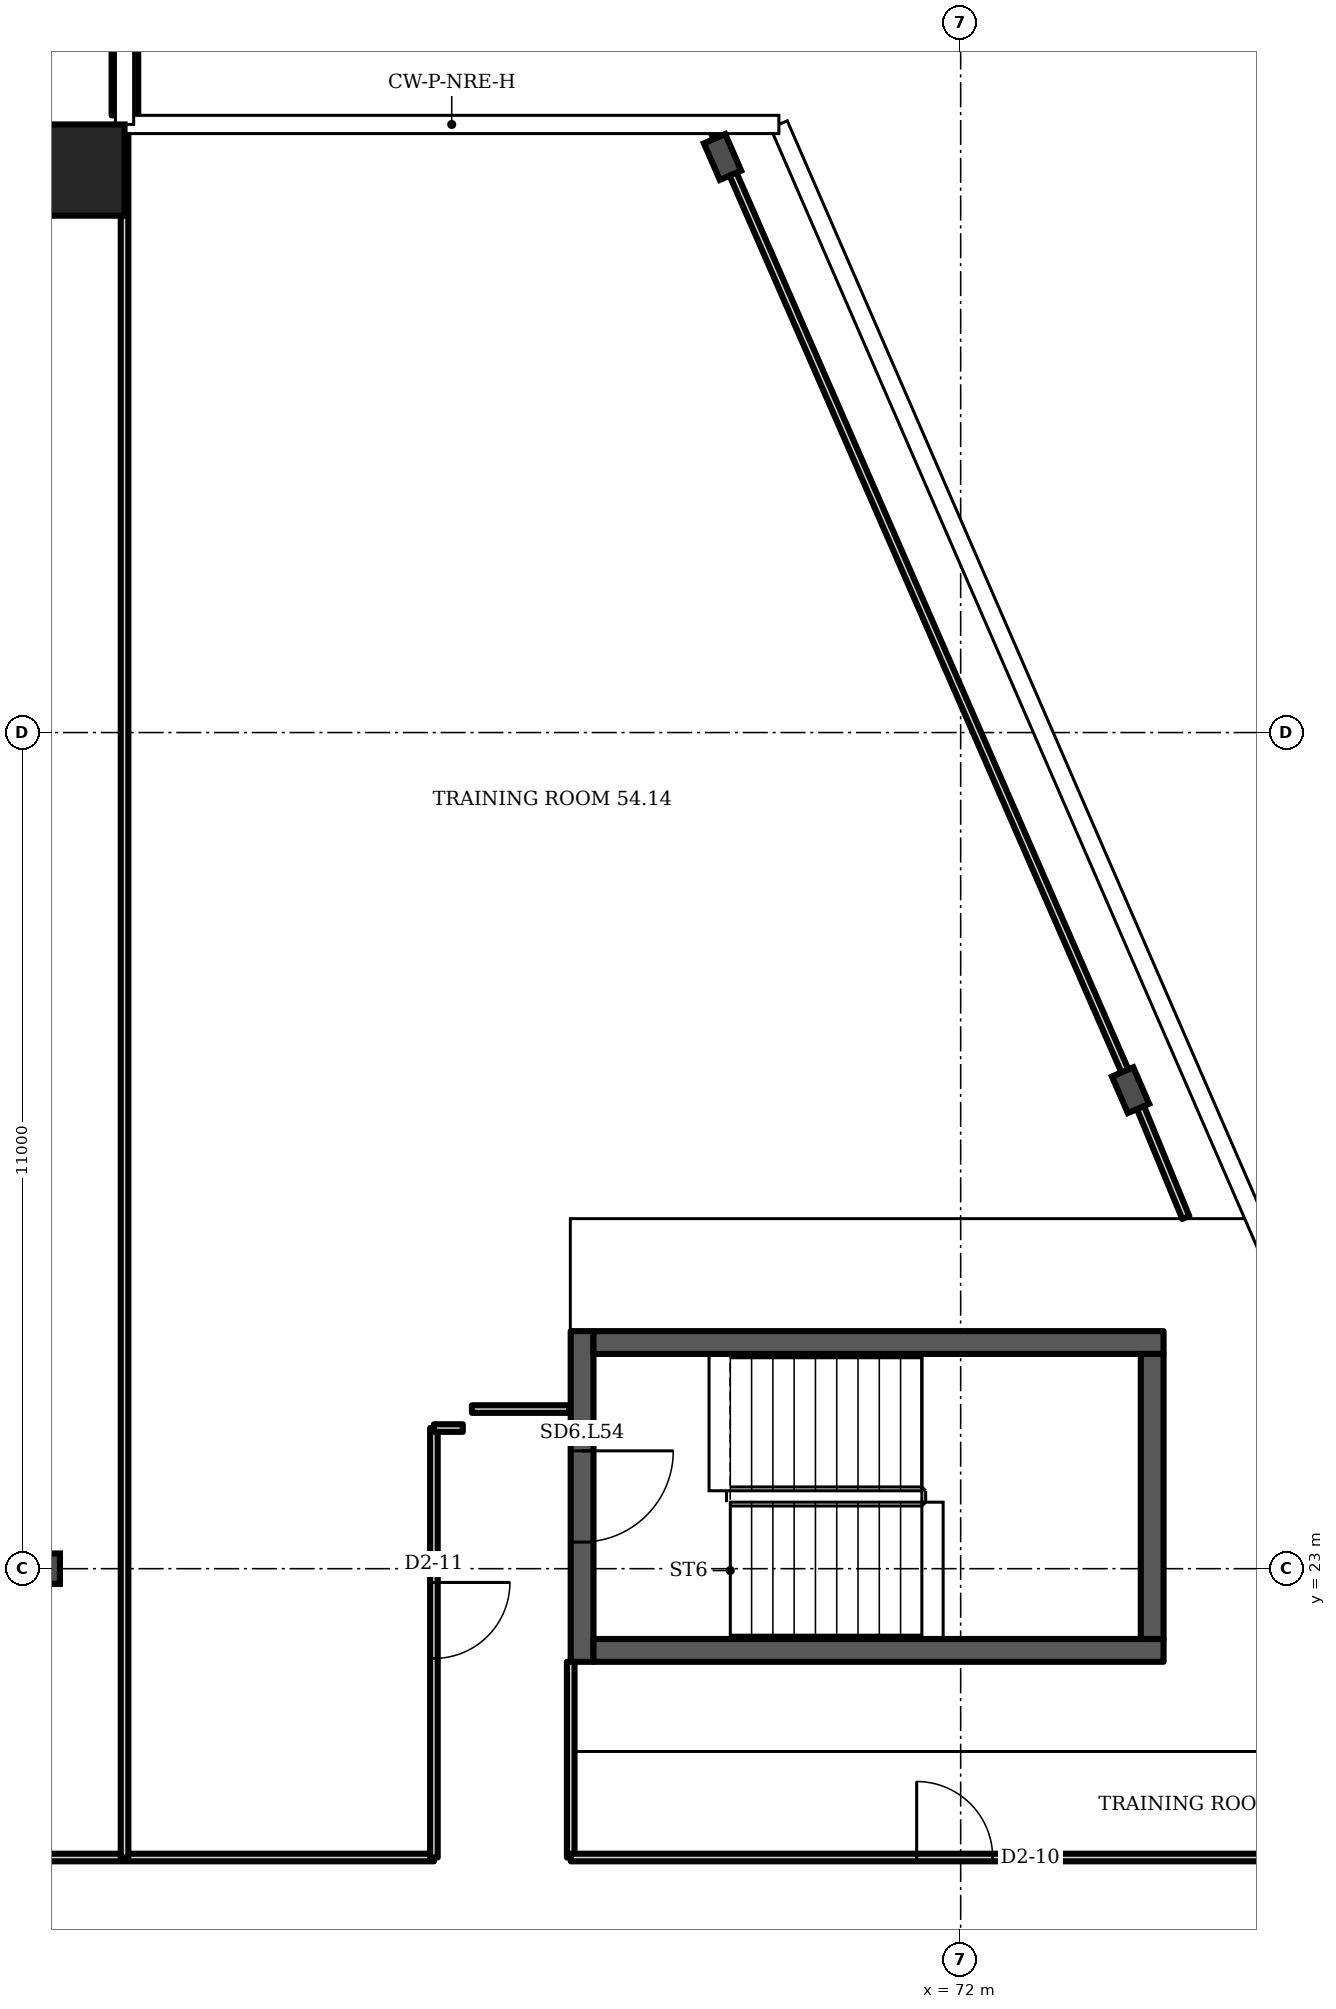
"""IFC4 building model, lengths in metres.
Left out: names, types, materials, properties, quantities, classifications, styles, units other than length and angle.
Written with IfcOpenShell. Run it as: python <this file> out.ifc"""

import sys

from ifc_helpers import new_model, si_unit, direction, frame, frame_2d, origin, origin_2d, place, context, subcontext, project, spatial, rectangle, i_section, extrude, element, fill, save


model = new_model("IFC4")
c1 = context("Model", 3, precision=1e-05, world=origin(), true_north=direction((0.0, 1.0)))
c2 = subcontext(c1, "Body", "Model", "MODEL_VIEW")
j1 = project(units=[si_unit("LENGTHUNIT", "METRE"), si_unit("PLANEANGLEUNIT", "RADIAN")], contexts=[c1])
p1 = place(None, origin())
s1 = spatial("IfcSite", under=j1, at=p1, CompositionType="ELEMENT")
p2 = place(p1, origin())
s2 = spatial("IfcBuilding", under=s1, at=p2, CompositionType="ELEMENT")
p3 = place(p2, frame((0.0, 0.0, 217.9)))
s3 = spatial("IfcBuildingStorey", under=s2, at=p3, CompositionType="ELEMENT", Elevation=217.9)
p4 = place(p3, frame((60.4, 41.4, 0.0), z_axis=(0.0, 0.0, 1.0), x_axis=(1.0, 0.0, 0.0)))
e1 = element("IfcColumn", 1, at=p4, inside=s3, PredefinedType="COLUMN", context=c2, shape_type="SweptSolid", body=[
    extrude(rectangle(XDim=1.2, YDim=1.2, at=origin_2d()), origin(), (0.0, 0.0, 1.0), 3.6),
])
for number, where, z_axis, x_axis in (
    (2, (74.235, 29.295, 0.0), (0.0, 0.0, 1.0), (0.917, 0.399, 0.0)),
    (3, (68.867, 41.572, 0.0), (0.0, 0.0, 1.0), (0.917, 0.399, 0.0)),
):
    element("IfcColumn", number, at=place(p3, frame(where, z_axis=z_axis, x_axis=x_axis)), inside=s3, PredefinedType="COLUMN", context=c2, shape_type="SweptSolid", body=[
        extrude(i_section(OverallWidth=0.306, OverallDepth=0.524, WebThickness=0.021, FlangeThickness=0.04, FilletRadius=0.027, at=origin_2d()), origin(), (0.0, 0.0, 1.0), 3.6),
    ])
p5 = place(p3, frame((60.0, 23.0, 0.0), z_axis=(0.0, 0.0, 1.0), x_axis=(1.0, 0.0, 0.0)))
e4 = element("IfcColumn", 4, at=p5, inside=s3, PredefinedType="COLUMN", context=c2, shape_type="SweptSolid", body=[
    extrude(i_section(OverallWidth=0.3, OverallDepth=0.4, WebThickness=0.013, FlangeThickness=0.024, FilletRadius=0.027, at=origin_2d()), origin(), (0.0, 0.0, 1.0), 3.6),
])
p6 = place(p3, frame((61.005, 42.12, 0.0), z_axis=(0.0, 0.0, 1.0), x_axis=(0.0, 1.0, 0.0)))
e5 = element("IfcWall", 5, at=p6, inside=s3, PredefinedType="SOLIDWALL", context=c2, shape_type="SweptSolid", body=[
    extrude(rectangle(XDim=6.006, YDim=0.35, at=frame_2d((3.003, 0.0))), origin(), (0.0, 0.0, 1.0), 1.0),
])
p7 = place(p3, frame((67.02, 21.775, 0.0), z_axis=(0.0, 0.0, 1.0), x_axis=(0.0, 1.0, 0.0)))
e6 = element("IfcWall", 6, at=p7, inside=s3, PredefinedType="SHEAR", context=c2, shape_type="SweptSolid", body=[
    extrude(rectangle(XDim=4.35, YDim=0.3, at=frame_2d((2.175, 0.0))), origin(), (0.0, 0.0, 1.0), 3.2),
])
p8 = place(p7, frame((1.575, 0.0, 0.0)))
e7 = element("IfcOpeningElement", 7, at=p8, cuts=e6, PredefinedType="OPENING", context=c2, shape_type="SweptSolid", body=[
    extrude(rectangle(XDim=1.2, YDim=2.1, at=frame_2d((0.6, 1.05))), frame((0.0, 0.16, 0.0), z_axis=(0.0, -1.0, 0.0), x_axis=(1.0, 0.0, 0.0)), (0.0, 0.0, 1.0), 0.32),
])
p9 = place(p3, frame((47.36, 19.2, 0.0), z_axis=(0.0, 0.0, 1.0), x_axis=(1.0, 0.0, 0.0)))
e8 = element("IfcWall", 8, at=p9, inside=s3, PredefinedType="PARTITIONING", context=c2, shape_type="SweptSolid", body=[
    extrude(rectangle(XDim=17.71, YDim=0.1, at=frame_2d((8.855, 0.0))), origin(), (0.0, 0.0, 1.0), 3.2),
])
p10 = place(p3, frame((61.0, 19.2, 0.0), z_axis=(0.0, 0.0, 1.0), x_axis=(0.0, 1.0, 0.0)))
e9 = element("IfcWall", 9, at=p10, inside=s3, PredefinedType="PARTITIONING", context=c2, shape_type="SweptSolid", body=[
    extrude(rectangle(XDim=22.78, YDim=0.1, at=frame_2d((11.39, 0.0))), origin(), (0.0, 0.0, 1.0), 3.2),
])
p11 = place(p3, frame((65.07, 19.2, 0.0), z_axis=(0.0, 0.0, 1.0), x_axis=(0.0, 1.0, 0.0)))
e10 = element("IfcWall", 10, at=p11, inside=s3, PredefinedType="PARTITIONING", context=c2, shape_type="SweptSolid", body=[
    extrude(rectangle(XDim=5.65, YDim=0.1, at=frame_2d((2.825, 0.0))), origin(), (0.0, 0.0, 1.0), 3.2),
])
p12 = place(p11, frame((2.619, 0.0, 0.0)))
e11 = element("IfcOpeningElement", 11, at=p12, cuts=e10, PredefinedType="OPENING", context=c2, shape_type="SweptSolid", body=[
    extrude(rectangle(XDim=1.0, YDim=2.1, at=frame_2d((0.5, 1.05))), frame((0.0, 0.06, 0.0), z_axis=(0.0, -1.0, 0.0), x_axis=(1.0, 0.0, 0.0)), (0.0, 0.0, 1.0), 0.12),
])
p13 = place(p3, frame((65.07, 24.85, 0.0), z_axis=(0.0, 0.0, 1.0), x_axis=(1.0, 0.0, 0.0)))
e12 = element("IfcWall", 12, at=p13, inside=s3, PredefinedType="PARTITIONING", context=c2, shape_type="SweptSolid", body=[
    extrude(rectangle(XDim=0.38, YDim=0.1, at=frame_2d((0.19, 0.0))), origin(), (0.0, 0.0, 1.0), 3.2),
])
p14 = place(p3, frame((65.57, 25.1, 0.0), z_axis=(0.0, 0.0, 1.0), x_axis=(1.0, 0.0, 0.0)))
e13 = element("IfcWall", 13, at=p14, inside=s3, PredefinedType="PARTITIONING", context=c2, shape_type="SweptSolid", body=[
    extrude(rectangle(XDim=1.28, YDim=0.1, at=frame_2d((0.64, 0.0))), origin(), (0.0, 0.0, 1.0), 3.2),
])
p15 = place(p3, frame((66.87, 19.2, 0.0), z_axis=(0.0, 0.0, 1.0), x_axis=(0.0, 1.0, 0.0)))
e14 = element("IfcWall", 14, at=p15, inside=s3, PredefinedType="PARTITIONING", context=c2, shape_type="SweptSolid", body=[
    extrude(rectangle(XDim=2.575, YDim=0.1, at=frame_2d((1.288, 0.0))), origin(), (0.0, 0.0, 1.0), 3.2),
])
p16 = place(p3, frame((66.87, 19.2, 0.0), z_axis=(0.0, 0.0, 1.0), x_axis=(1.0, 0.0, 0.0)))
e15 = element("IfcWall", 15, at=p16, inside=s3, PredefinedType="PARTITIONING", context=c2, shape_type="SweptSolid", body=[
    extrude(rectangle(XDim=11.57, YDim=0.1, at=frame_2d((5.785, 0.0))), origin(), (0.0, 0.0, 1.0), 3.2),
])
p17 = place(p16, frame((4.551, 0.0, 0.0)))
e16 = element("IfcOpeningElement", 16, at=p17, cuts=e15, PredefinedType="OPENING", context=c2, shape_type="SweptSolid", body=[
    extrude(rectangle(XDim=1.0, YDim=2.1, at=frame_2d((0.5, 1.05))), frame((0.0, 0.06, 0.0), z_axis=(0.0, -1.0, 0.0), x_axis=(1.0, 0.0, 0.0)), (0.0, 0.0, 1.0), 0.12),
])
p18 = place(p3, frame((74.265, 29.31, 0.0), z_axis=(0.0, 0.0, 1.0), x_axis=(-0.400401, 0.916335, 0.0)))
e17 = element("IfcWall", 17, at=p18, inside=s3, PredefinedType="PARTITIONING", context=c2, shape_type="SweptSolid", body=[
    extrude(rectangle(XDim=13.795, YDim=0.1, at=frame_2d((6.897, 0.0))), origin(), (0.0, 0.0, 1.0), 2.58),
])
p19 = place(p3, frame((74.962, 27.62, 0.0), z_axis=(0.0, 0.0, 1.0), x_axis=(-0.381293, 0.924452, 0.0)))
e18 = element("IfcWall", 18, at=p19, inside=s3, PredefinedType="PARTITIONING", context=c2, shape_type="SweptSolid", body=[
    extrude(rectangle(XDim=1.828, YDim=0.1, at=frame_2d((0.914, 0.0))), origin(), (0.0, 0.0, 1.0), 2.58),
])
for number, where, z_axis, x_axis in (
    (19, (67.17, 21.925, 0.0), (0.0, 0.0, 1.0), (1.0, 0.0, 0.0)),
    (20, (67.17, 25.975, 0.0), (0.0, 0.0, 1.0), (1.0, 0.0, 0.0)),
):
    element("IfcWall", number, at=place(p3, frame(where, z_axis=z_axis, x_axis=x_axis)), inside=s3, PredefinedType="SHEAR", context=c2, shape_type="SweptSolid", body=[
        extrude(rectangle(XDim=7.5, YDim=0.3, at=frame_2d((3.75, 0.0))), origin(), (0.0, 0.0, 1.0), 3.2),
    ])
p20 = place(p3, frame((74.52, 22.075, 0.0), z_axis=(0.0, 0.0, 1.0), x_axis=(0.0, 1.0, 0.0)))
e21 = element("IfcWall", 21, at=p20, inside=s3, PredefinedType="SHEAR", context=c2, shape_type="SweptSolid", body=[
    extrude(rectangle(XDim=3.75, YDim=0.3, at=frame_2d((1.875, 0.0))), origin(), (0.0, 0.0, 1.0), 3.2),
])
p21 = place(p8, origin())
e22 = element("IfcDoor", 22, at=p21, inside=s3, OperationType="SINGLE_SWING_RIGHT", PredefinedType="DOOR", context=c2, shape_type="SweptSolid", body=[
    extrude(rectangle(XDim=1.2, YDim=2.1, at=frame_2d((0.6, 1.05))), frame((0.0, 0.025, 0.0), z_axis=(0.0, -1.0, 0.0), x_axis=(1.0, 0.0, 0.0)), (0.0, 0.0, 1.0), 0.05),
])
fill(e7, e22)
p22 = place(p17, origin())
e23 = element("IfcDoor", 23, at=p22, inside=s3, OperationType="SINGLE_SWING_LEFT", PredefinedType="DOOR", context=c2, shape_type="SweptSolid", body=[
    extrude(rectangle(XDim=1.0, YDim=2.1, at=frame_2d((0.5, 1.05))), frame((0.0, 0.025, 0.0), z_axis=(0.0, -1.0, 0.0), x_axis=(1.0, 0.0, 0.0)), (0.0, 0.0, 1.0), 0.05),
])
fill(e16, e23)
p23 = place(p12, origin())
e24 = element("IfcDoor", 24, at=p23, inside=s3, OperationType="SINGLE_SWING_RIGHT", PredefinedType="DOOR", context=c2, shape_type="SweptSolid", body=[
    extrude(rectangle(XDim=1.0, YDim=2.1, at=frame_2d((0.5, 1.05))), frame((0.0, 0.025, 0.0), z_axis=(0.0, -1.0, 0.0), x_axis=(1.0, 0.0, 0.0)), (0.0, 0.0, 1.0), 0.05),
])
fill(e11, e24)
save(model, sys.argv[1])
